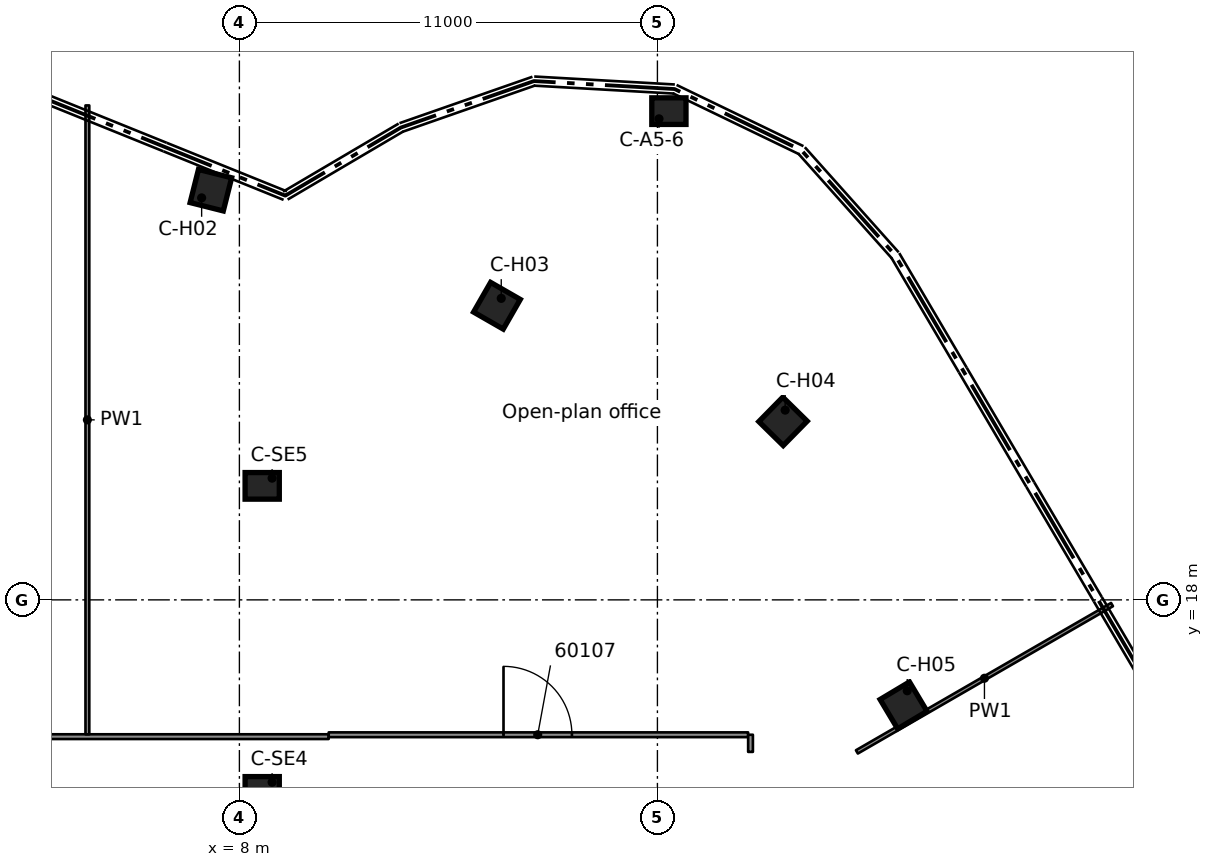
"""IFC4 building model, lengths in metres.
Left out: names, types, materials, properties, quantities, classifications, styles, units other than length and angle.
Written with IfcOpenShell. Run it as: python <this file> out.ifc"""

import sys

from ifc_helpers import new_model, si_unit, direction, frame, frame_2d, origin, origin_2d, place, context, subcontext, project, spatial, rectangle, extrude, element, fill, save


model = new_model("IFC4")
c1 = context("Model", 3, precision=1e-05, world=origin(), true_north=direction((0.0, 1.0)))
c2 = subcontext(c1, "Body", "Model", "MODEL_VIEW")
j1 = project(units=[si_unit("LENGTHUNIT", "METRE"), si_unit("PLANEANGLEUNIT", "RADIAN")], contexts=[c1])
p1 = place(None, origin())
s1 = spatial("IfcSite", under=j1, at=p1, CompositionType="ELEMENT")
p2 = place(p1, origin())
s2 = spatial("IfcBuilding", under=s1, at=p2, CompositionType="ELEMENT")
p3 = place(p2, frame((0.0, 0.0, 292.9)))
s3 = spatial("IfcBuildingStorey", under=s2, at=p3, CompositionType="ELEMENT", Elevation=292.9)
p4 = place(p3, frame((19.302, 30.86, 0.0), z_axis=(0.0, 0.0, 1.0), x_axis=(1.0, 0.0, 0.0)))
e1 = element("IfcColumn", 1, at=p4, inside=s3, PredefinedType="COLUMN", context=c2, shape_type="SweptSolid", body=[
    extrude(rectangle(XDim=0.9, YDim=0.7, at=origin_2d()), origin(), (0.0, 0.0, 1.0), 3.5),
])
for number, where, z_axis, x_axis in (
    (2, (7.25, 28.78, 0.0), (0.0, 0.0, 1.0), (0.244, 0.97, 0.0)),
    (3, (14.777, 25.739, 0.0), (0.0, 0.0, 1.0), (0.498, 0.867, 0.0)),
    (4, (22.305, 22.697, 0.0), (0.0, 0.0, 1.0), (0.701, 0.713, 0.0)),
    (5, (25.477, 15.224, 0.0), (0.0, 0.0, 1.0), (0.858, 0.513, 0.0)),
):
    element("IfcColumn", number, at=place(p3, frame(where, z_axis=z_axis, x_axis=x_axis)), inside=s3, PredefinedType="COLUMN", context=c2, shape_type="SweptSolid", body=[
        extrude(rectangle(XDim=0.9, YDim=0.9, at=origin_2d()), origin(), (0.0, 0.0, 1.0), 3.5),
    ])
for number, where, z_axis, x_axis in (
    (6, (8.6, 13.0, 0.0), (0.0, 0.0, 1.0), (1.0, 0.0, 0.0)),
    (7, (8.6, 21.0, 0.0), (0.0, 0.0, 1.0), (1.0, 0.0, 0.0)),
):
    element("IfcColumn", number, at=place(p3, frame(where, z_axis=z_axis, x_axis=x_axis)), inside=s3, PredefinedType="COLUMN", context=c2, shape_type="SweptSolid", body=[
        extrude(rectangle(XDim=0.9, YDim=0.7, at=origin_2d()), origin(), (0.0, 0.0, 1.0), 3.5),
    ])
p5 = place(p3, frame((-10.39, 14.401, 0.0), z_axis=(0.0, 0.0, 1.0), x_axis=(1.0, 0.0, 0.0)))
e8 = element("IfcWall", 8, at=p5, inside=s3, PredefinedType="PARTITIONING", context=c2, shape_type="SweptSolid", body=[
    extrude(rectangle(XDim=20.739, YDim=0.125, at=frame_2d((10.37, 0.0))), origin(), (0.0, 0.0, 1.0), 3.08),
])
p6 = place(p5, frame((9.49, 0.0, 0.0)))
e9 = element("IfcOpeningElement", 9, at=p6, cuts=e8, PredefinedType="OPENING", context=c2, shape_type="SweptSolid", body=[
    extrude(rectangle(XDim=1.8, YDim=2.1, at=frame_2d((0.9, 1.05))), frame((0.0, 0.073, 0.0), z_axis=(0.0, -1.0, 0.0), x_axis=(1.0, 0.0, 0.0)), (0.0, 0.0, 1.0), 0.145),
])
p7 = place(p3, frame((10.35, 14.451, 0.0), z_axis=(0.0, 0.0, 1.0), x_axis=(1.0, 0.0, 0.0)))
e10 = element("IfcWall", 10, at=p7, inside=s3, PredefinedType="PARTITIONING", context=c2, shape_type="SweptSolid", body=[
    extrude(rectangle(XDim=11.037, YDim=0.125, at=frame_2d((5.519, 0.0))), origin(), (0.0, 0.0, 1.0), 3.08),
])
p8 = place(p7, frame((4.6, 0.0, 0.0)))
e11 = element("IfcOpeningElement", 11, at=p8, cuts=e10, PredefinedType="OPENING", context=c2, shape_type="SweptSolid", body=[
    extrude(rectangle(XDim=1.8, YDim=2.1, at=frame_2d((0.9, 1.05))), frame((0.0, 0.073, 0.0), z_axis=(0.0, -1.0, 0.0), x_axis=(1.0, 0.0, 0.0)), (0.0, 0.0, 1.0), 0.145),
])
p9 = place(p3, frame((24.249, 14.0, 0.0), z_axis=(0.0, 0.0, 1.0), x_axis=(0.866009351323, 0.500027802648, 0.0)))
e12 = element("IfcWall", 12, at=p9, inside=s3, PredefinedType="PARTITIONING", context=c2, shape_type="SweptSolid", body=[
    extrude(rectangle(XDim=7.751, YDim=0.1, at=frame_2d((3.876, 0.0))), origin(), (0.0, 0.0, 1.0), 3.08),
])
p10 = place(p3, frame((21.45, 14.0, 0.0), z_axis=(0.0, 0.0, 1.0), x_axis=(0.0, 1.0, 0.0)))
e13 = element("IfcWall", 13, at=p10, inside=s3, PredefinedType="PARTITIONING", context=c2, shape_type="SweptSolid", body=[
    extrude(rectangle(XDim=0.451, YDim=0.125, at=frame_2d((0.226, 0.0))), origin(), (0.0, 0.0, 1.0), 3.08),
])
p11 = place(p3, frame((4.0, 14.463, 0.0), z_axis=(0.0, 0.0, 1.0), x_axis=(0.0, 1.0, 0.0)))
e14 = element("IfcWall", 14, at=p11, inside=s3, PredefinedType="PARTITIONING", context=c2, shape_type="SweptSolid", body=[
    extrude(rectangle(XDim=16.547, YDim=0.1, at=frame_2d((8.273, 0.0))), origin(), (0.0, 0.0, 1.0), 3.08),
])
p12 = place(p8, origin())
e15 = element("IfcDoor", 15, at=p12, inside=s3, OperationType="DOUBLE_DOOR_SINGLE_SWING", PredefinedType="DOOR", context=c2, shape_type="SweptSolid", body=[
    extrude(rectangle(XDim=1.8, YDim=2.1, at=frame_2d((0.9, 1.05))), frame((0.0, 0.025, 0.0), z_axis=(0.0, -1.0, 0.0), x_axis=(1.0, 0.0, 0.0)), (0.0, 0.0, 1.0), 0.05),
])
fill(e11, e15)
save(model, sys.argv[1])
